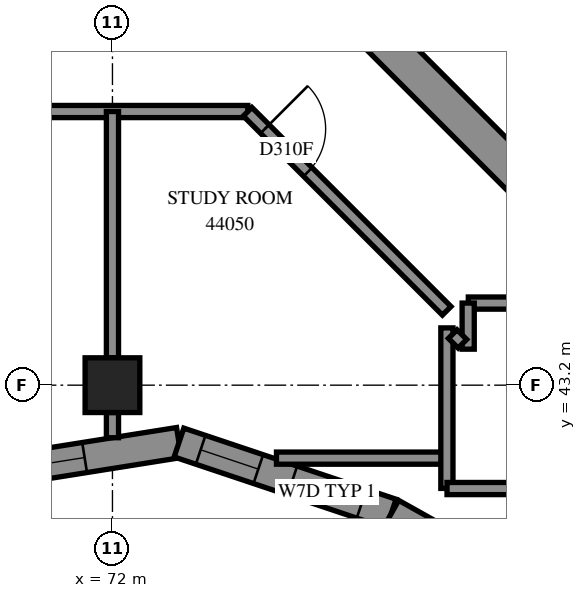
"""IFC4 building model, lengths in metres.
Left out: names, types, materials, properties, quantities, classifications, styles, units other than length and angle.
Written with IfcOpenShell. Run it as: python <this file> out.ifc"""

import sys

from ifc_helpers import new_model, si_unit, direction, frame, frame_2d, origin, origin_2d, place, context, subcontext, project, spatial, polyline, rectangle, outline, extrude, element, fill, save


model = new_model("IFC4")
c1 = context("Model", 3, precision=1e-05, world=origin(), true_north=direction((0.0, 1.0)))
c2 = subcontext(c1, "Body", "Model", "MODEL_VIEW")
j1 = project(units=[si_unit("LENGTHUNIT", "METRE"), si_unit("PLANEANGLEUNIT", "RADIAN")], contexts=[c1])
p1 = place(None, origin())
s1 = spatial("IfcSite", under=j1, at=p1, CompositionType="ELEMENT")
p2 = place(p1, origin())
s2 = spatial("IfcBuilding", under=s1, at=p2, CompositionType="ELEMENT")
p3 = place(p2, frame((0.0, 0.0, 162.6)))
s3 = spatial("IfcBuildingStorey", under=s2, at=p3, CompositionType="ELEMENT", Elevation=162.6)
p4 = place(p3, frame((72.0, 43.2, 0.0), z_axis=(0.0, 0.0, 1.0), x_axis=(1.0, 0.0, 0.0)))
e1 = element("IfcColumn", 1, at=p4, inside=s3, PredefinedType="COLUMN", context=c2, shape_type="SweptSolid", body=[
    extrude(rectangle(XDim=0.9, YDim=0.9, at=origin_2d()), origin(), (0.0, 0.0, 1.0), 3.1),
])
p5 = place(p3, frame((76.018, 49.302, -0.3), z_axis=(0.0, 0.0, 1.0), x_axis=(0.7071067812, -0.7071067812, 0.0)))
e2 = element("IfcWall", 2, at=p5, inside=s3, PredefinedType="SHEAR", context=c2, shape_type="SweptSolid", body=[
    extrude(rectangle(XDim=15.6, YDim=0.6, at=frame_2d((7.8, 0.0))), origin(), (0.0, 0.0, 1.0), 2.7),
])
p6 = place(p3, frame((69.662, 41.711, 0.0), z_axis=(0.0, 0.0, 1.0), x_axis=(0.9876042465, 0.1569644935, 0.0)))
e3 = element("IfcWall", 3, at=p6, inside=s3, PredefinedType="SOLIDWALL", context=c2, shape_type="SweptSolid", body=[
    extrude(outline(polyline([(-0.04, -0.25), (3.413, -0.25), (3.536, 0.25), (0.04, 0.25), (-0.04, -0.25)])), origin(), (0.0, 0.0, 1.0), 3.1),
])
p7 = place(p6, frame((0.704, 0.0, 0.45)))
e4 = element("IfcOpeningElement", 4, at=p7, cuts=e3, PredefinedType="OPENING", context=c2, shape_type="SweptSolid", body=[
    extrude(rectangle(XDim=1.2, YDim=2.5, at=frame_2d((0.6, 1.25))), frame((0.0, 0.26, 0.0), z_axis=(0.0, -1.0, 0.0), x_axis=(1.0, 0.0, 0.0)), (0.0, 0.0, 1.0), 0.52),
])
p8 = place(p3, frame((73.094, 42.257, 0.0), z_axis=(0.0, 0.0, 1.0), x_axis=(0.9482477624, -0.3175313861, 0.0)))
e5 = element("IfcWall", 5, at=p8, inside=s3, PredefinedType="SOLIDWALL", context=c2, shape_type="SweptSolid", body=[
    extrude(outline(polyline([(0.061, -0.25), (3.658, -0.25), (3.705, 0.25), (-0.061, 0.25), (0.061, -0.25)])), origin(), (0.0, 0.0, 1.0), 3.1),
])
p9 = place(p8, frame((0.376, 0.0, 0.45)))
e6 = element("IfcOpeningElement", 6, at=p9, cuts=e5, PredefinedType="OPENING", context=c2, shape_type="SweptSolid", body=[
    extrude(rectangle(XDim=1.0, YDim=2.5, at=frame_2d((0.5, 1.25))), frame((0.0, 0.26, 0.0), z_axis=(0.0, -1.0, 0.0), x_axis=(1.0, 0.0, 0.0)), (0.0, 0.0, 1.0), 0.52),
])
p10 = place(p8, frame((1.967, 0.0, 0.5)))
e7 = element("IfcOpeningElement", 7, at=p10, cuts=e5, PredefinedType="OPENING", context=c2, shape_type="SweptSolid", body=[
    extrude(rectangle(XDim=1.2, YDim=2.45, at=frame_2d((0.6, 1.225))), frame((0.0, 0.26, 0.0), z_axis=(0.0, -1.0, 0.0), x_axis=(1.0, 0.0, 0.0)), (0.0, 0.0, 1.0), 0.52),
])
p11 = place(p3, frame((76.585, 41.088, 0.0), z_axis=(0.0, 0.0, 1.0), x_axis=(0.8724681922, -0.4886709053, 0.0)))
e8 = element("IfcWall", 8, at=p11, inside=s3, PredefinedType="SOLIDWALL", context=c2, shape_type="SweptSolid", body=[
    extrude(outline(polyline([(0.024, -0.25), (4.231, -0.25), (4.335, 0.25), (-0.024, 0.25), (0.024, -0.25)])), origin(), (0.0, 0.0, 1.0), 3.1),
])
p12 = place(p11, frame((0.727, 0.0, 0.45)))
e9 = element("IfcOpeningElement", 9, at=p12, cuts=e8, PredefinedType="OPENING", context=c2, shape_type="SweptSolid", body=[
    extrude(rectangle(XDim=1.2, YDim=2.5, at=frame_2d((0.6, 1.25))), frame((0.0, 0.26, 0.0), z_axis=(0.0, -1.0, 0.0), x_axis=(1.0, 0.0, 0.0)), (0.0, 0.0, 1.0), 0.52),
])
p13 = place(p11, frame((2.268, 0.0, 0.45)))
e10 = element("IfcOpeningElement", 10, at=p13, cuts=e8, PredefinedType="OPENING", context=c2, shape_type="SweptSolid", body=[
    extrude(rectangle(XDim=1.2, YDim=2.5, at=frame_2d((0.6, 1.25))), frame((0.0, 0.26, 0.0), z_axis=(0.0, -1.0, 0.0), x_axis=(1.0, 0.0, 0.0)), (0.0, 0.0, 1.0), 0.52),
])
p14 = place(p3, frame((54.9, 47.7, 0.0), z_axis=(0.0, 0.0, 1.0), x_axis=(1.0, 0.0, 0.0)))
e11 = element("IfcWall", 11, at=p14, inside=s3, PredefinedType="PARTITIONING", context=c2, shape_type="SweptSolid", body=[
    extrude(rectangle(XDim=19.326, YDim=0.2, at=frame_2d((9.663, 0.0))), origin(), (0.0, 0.0, 1.0), 3.1),
])
p15 = place(p14, frame((6.599, 0.0, 0.0)))
e12 = element("IfcOpeningElement", 12, at=p15, cuts=e11, PredefinedType="OPENING", context=c2, shape_type="SweptSolid", body=[
    extrude(rectangle(XDim=0.9, YDim=2.1, at=frame_2d((0.45, 1.05))), frame((0.0, 0.11, 0.0), z_axis=(0.0, -1.0, 0.0), x_axis=(1.0, 0.0, 0.0)), (0.0, 0.0, 1.0), 0.22),
])
p16 = place(p14, frame((13.799, 0.0, 0.0)))
e13 = element("IfcOpeningElement", 13, at=p16, cuts=e11, PredefinedType="OPENING", context=c2, shape_type="SweptSolid", body=[
    extrude(rectangle(XDim=0.9, YDim=2.1, at=frame_2d((0.45, 1.05))), frame((0.0, 0.11, 0.0), z_axis=(0.0, -1.0, 0.0), x_axis=(1.0, 0.0, 0.0)), (0.0, 0.0, 1.0), 0.22),
])
p17 = place(p3, frame((74.223, 47.697, 0.0), z_axis=(0.0, 0.0, 1.0), x_axis=(0.7071067812, -0.7071067812, 0.0)))
e14 = element("IfcWall", 14, at=p17, inside=s3, PredefinedType="PARTITIONING", context=c2, shape_type="SweptSolid", body=[
    extrude(rectangle(XDim=4.63, YDim=0.2, at=frame_2d((2.315, 0.0))), origin(), (0.0, 0.0, 1.0), 3.1),
])
p18 = place(p17, frame((0.401, 0.0, 0.0)))
e15 = element("IfcOpeningElement", 15, at=p18, cuts=e14, PredefinedType="OPENING", context=c2, shape_type="SweptSolid", body=[
    extrude(rectangle(XDim=1.0, YDim=2.1, at=frame_2d((0.5, 1.05))), frame((0.0, 0.11, 0.0), z_axis=(0.0, -1.0, 0.0), x_axis=(1.0, 0.0, 0.0)), (0.0, 0.0, 1.0), 0.22),
])
p19 = place(p3, frame((72.0, 43.65, 0.0), z_axis=(0.0, 0.0, 1.0), x_axis=(0.0, 1.0, 0.0)))
e16 = element("IfcWall", 16, at=p19, inside=s3, PredefinedType="PARTITIONING", context=c2, shape_type="SweptSolid", body=[
    extrude(rectangle(XDim=4.05, YDim=0.2, at=frame_2d((2.025, 0.0))), origin(), (0.0, 0.0, 1.0), 3.1),
])
p20 = place(p3, frame((74.697, 42.0, 0.0), z_axis=(0.0, 0.0, 1.0), x_axis=(1.0, 0.0, 0.0)))
e17 = element("IfcWall", 17, at=p20, inside=s3, PredefinedType="PARTITIONING", context=c2, shape_type="SweptSolid", body=[
    extrude(rectangle(XDim=2.803, YDim=0.2, at=frame_2d((1.401, 0.0))), origin(), (0.0, 0.0, 1.0), 3.1),
])
for number, where, z_axis, x_axis in (
    (18, (77.5, 41.502, 0.0), (0.0, 0.0, 1.0), (0.0, 1.0, 0.0)),
    (19, (77.502, 41.5, 0.0), (0.0, 0.0, 1.0), (1.0, 0.0, 0.0)),
):
    element("IfcWall", number, at=place(p3, frame(where, z_axis=z_axis, x_axis=x_axis)), inside=s3, PredefinedType="PARTITIONING", context=c2, shape_type="SweptSolid", body=[
        extrude(rectangle(XDim=2.64, YDim=0.2, at=frame_2d((1.32, 0.0))), origin(), (0.0, 0.0, 1.0), 3.1),
    ])
p21 = place(p3, frame((77.852, 44.55, 0.0), z_axis=(0.0, 0.0, 1.0), x_axis=(1.0, 0.0, 0.0)))
e20 = element("IfcWall", 20, at=p21, inside=s3, PredefinedType="PARTITIONING", context=c2, shape_type="SweptSolid", body=[
    extrude(rectangle(XDim=2.38, YDim=0.2, at=frame_2d((1.19, 0.0))), origin(), (0.0, 0.0, 1.0), 3.1),
])
p22 = place(p3, frame((77.85, 43.792, 0.0), z_axis=(0.0, 0.0, 1.0), x_axis=(0.0, 1.0, 0.0)))
e21 = element("IfcWall", 21, at=p22, inside=s3, PredefinedType="PARTITIONING", context=c2, shape_type="SweptSolid", body=[
    extrude(rectangle(XDim=0.758, YDim=0.2, at=frame_2d((0.379, 0.0))), origin(), (0.0, 0.0, 1.0), 3.1),
])
p23 = place(p3, frame((77.596, 44.04, 0.0), z_axis=(0.0, 0.0, 1.0), x_axis=(0.7071067812, -0.7071067812, 0.0)))
e22 = element("IfcWall", 22, at=p23, inside=s3, PredefinedType="PARTITIONING", context=c2, shape_type="SweptSolid", body=[
    extrude(rectangle(XDim=0.225, YDim=0.2, at=frame_2d((0.113, 0.0))), origin(), (0.0, 0.0, 1.0), 3.1),
])
p24 = place(p3, frame((72.0, 42.336, 0.0), z_axis=(0.0, 0.0, 1.0), x_axis=(0.0, 1.0, 0.0)))
e23 = element("IfcWall", 23, at=p24, inside=s3, PredefinedType="PARTITIONING", context=c2, shape_type="SweptSolid", body=[
    extrude(rectangle(XDim=0.414, YDim=0.2, at=frame_2d((0.207, 0.0))), origin(), (0.0, 0.0, 1.0), 3.1),
])
p25 = place(p7, origin())
e24 = element("IfcWindow", 24, at=p25, inside=s3, PartitioningType="SINGLE_PANEL", PredefinedType="WINDOW", context=c2, shape_type="SweptSolid", body=[
    extrude(rectangle(XDim=1.2, YDim=2.5, at=frame_2d((0.6, 1.25))), frame((0.0, 0.18, 0.0), z_axis=(0.0, -1.0, 0.0), x_axis=(1.0, 0.0, 0.0)), (0.0, 0.0, 1.0), 0.06),
])
fill(e4, e24)
p26 = place(p18, origin())
e25 = element("IfcDoor", 25, at=p26, inside=s3, OperationType="SINGLE_SWING_LEFT", PredefinedType="DOOR", context=c2, shape_type="SweptSolid", body=[
    extrude(rectangle(XDim=1.0, YDim=2.1, at=frame_2d((0.5, 1.05))), frame((0.0, 0.025, 0.0), z_axis=(0.0, -1.0, 0.0), x_axis=(1.0, 0.0, 0.0)), (0.0, 0.0, 1.0), 0.05),
])
fill(e15, e25)
p27 = place(p9, origin())
e26 = element("IfcWindow", 26, at=p27, inside=s3, PartitioningType="SINGLE_PANEL", PredefinedType="WINDOW", context=c2, shape_type="SweptSolid", body=[
    extrude(rectangle(XDim=1.0, YDim=2.5, at=frame_2d((0.5, 1.25))), frame((0.0, 0.18, 0.0), z_axis=(0.0, -1.0, 0.0), x_axis=(1.0, 0.0, 0.0)), (0.0, 0.0, 1.0), 0.06),
])
fill(e6, e26)
p28 = place(p10, origin())
e27 = element("IfcWindow", 27, at=p28, inside=s3, PartitioningType="SINGLE_PANEL", PredefinedType="WINDOW", context=c2, shape_type="SweptSolid", body=[
    extrude(rectangle(XDim=1.2, YDim=2.45, at=frame_2d((0.6, 1.225))), frame((0.0, 0.18, 0.0), z_axis=(0.0, -1.0, 0.0), x_axis=(1.0, 0.0, 0.0)), (0.0, 0.0, 1.0), 0.06),
])
fill(e7, e27)
save(model, sys.argv[1])
